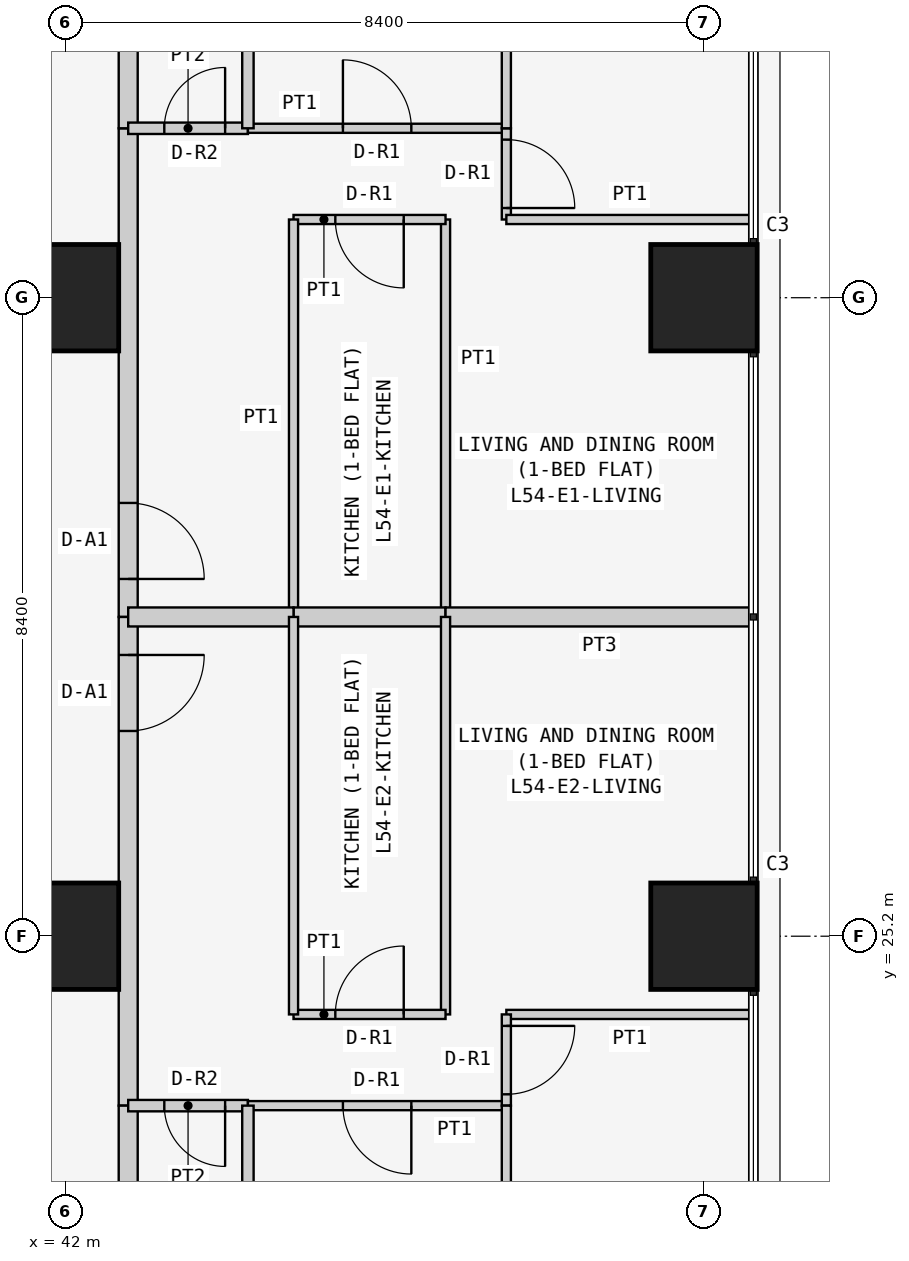
"""IFC4 building model, lengths in metres.
Left out: names, types, materials, properties, quantities, classifications, styles, units other than length and angle.
Written with IfcOpenShell. Run it as: python <this file> out.ifc"""

import sys

from ifc_helpers import new_model, si_unit, direction, frame, frame_2d, origin, origin_2d, place, context, subcontext, project, spatial, rectangle, extrude, element, fill, save


model = new_model("IFC4")
c1 = context("Model", 3, precision=1e-05, world=origin(), true_north=direction((0.0, 1.0)))
c2 = subcontext(c1, "Body", "Model", "MODEL_VIEW")
j1 = project(units=[si_unit("LENGTHUNIT", "METRE"), si_unit("PLANEANGLEUNIT", "RADIAN")], contexts=[c1])
p1 = place(None, origin())
s1 = spatial("IfcSite", under=j1, at=p1, CompositionType="ELEMENT")
p2 = place(p1, origin())
s2 = spatial("IfcBuilding", under=s1, at=p2, CompositionType="ELEMENT")
p3 = place(p2, frame((0.0, 0.0, 208.5)))
s3 = spatial("IfcBuildingStorey", under=s2, at=p3, CompositionType="ELEMENT", Elevation=208.5)
for number, where, z_axis, x_axis in (
    (1, (42.0, 25.2, 0.0), (0.0, 0.0, 1.0), (1.0, 0.0, 0.0)),
    (2, (42.0, 33.6, 0.0), (0.0, 0.0, 1.0), (1.0, 0.0, 0.0)),
    (3, (50.4, 25.2, 0.0), (0.0, 0.0, 1.0), (1.0, 0.0, 0.0)),
    (4, (50.4, 33.6, 0.0), (0.0, 0.0, 1.0), (1.0, 0.0, 0.0)),
):
    element("IfcColumn", number, at=place(p3, frame(where, z_axis=z_axis, x_axis=x_axis)), inside=s3, PredefinedType="COLUMN", context=c2, shape_type="SweptSolid", body=[
        extrude(rectangle(XDim=1.4, YDim=1.4, at=origin_2d()), origin(), (0.0, 0.0, 1.0), 3.6),
    ])
p4 = place(p3, frame((42.825, 35.829, 0.0), z_axis=(0.0, 0.0, 1.0), x_axis=(0.0, -1.0, 0.0)))
e5 = element("IfcWall", 5, at=p4, inside=s3, PredefinedType="PARTITIONING", context=c2, shape_type="SweptSolid", body=[
    extrude(rectangle(XDim=6.429, YDim=0.25, at=frame_2d((3.215, 0.0))), origin(), (0.0, 0.0, 1.0), 3.45),
])
p5 = place(p4, frame((4.929, 0.0, 0.0)))
e6 = element("IfcOpeningElement", 6, at=p5, cuts=e5, PredefinedType="OPENING", context=c2, shape_type="SweptSolid", body=[
    extrude(rectangle(XDim=1.0, YDim=2.1, at=frame_2d((0.5, 1.05))), frame((0.0, 0.135, 0.0), z_axis=(0.0, -1.0, 0.0), x_axis=(1.0, 0.0, 0.0)), (0.0, 0.0, 1.0), 0.27),
])
p6 = place(p3, frame((42.825, 42.7, 0.0), z_axis=(0.0, 0.0, 1.0), x_axis=(0.0, -1.0, 0.0)))
e7 = element("IfcWall", 7, at=p6, inside=s3, PredefinedType="PARTITIONING", context=c2, shape_type="SweptSolid", body=[
    extrude(rectangle(XDim=6.871, YDim=0.25, at=frame_2d((3.436, 0.0))), origin(), (0.0, 0.0, 1.0), 3.45),
])
p7 = place(p3, frame((42.825, 29.4, 0.0), z_axis=(0.0, 0.0, 1.0), x_axis=(0.0, -1.0, 0.0)))
e8 = element("IfcWall", 8, at=p7, inside=s3, PredefinedType="PARTITIONING", context=c2, shape_type="SweptSolid", body=[
    extrude(rectangle(XDim=6.429, YDim=0.25, at=frame_2d((3.214, 0.0))), origin(), (0.0, 0.0, 1.0), 3.45),
])
p8 = place(p7, frame((0.5, 0.0, 0.0)))
e9 = element("IfcOpeningElement", 9, at=p8, cuts=e8, PredefinedType="OPENING", context=c2, shape_type="SweptSolid", body=[
    extrude(rectangle(XDim=1.0, YDim=2.1, at=frame_2d((0.5, 1.05))), frame((0.0, 0.135, 0.0), z_axis=(0.0, -1.0, 0.0), x_axis=(1.0, 0.0, 0.0)), (0.0, 0.0, 1.0), 0.27),
])
p9 = place(p3, frame((42.825, 22.971, 0.0), z_axis=(0.0, 0.0, 1.0), x_axis=(0.0, -1.0, 0.0)))
e10 = element("IfcWall", 10, at=p9, inside=s3, PredefinedType="PARTITIONING", context=c2, shape_type="SweptSolid", body=[
    extrude(rectangle(XDim=6.871, YDim=0.25, at=frame_2d((3.436, 0.0))), origin(), (0.0, 0.0, 1.0), 3.45),
])
p10 = place(p3, frame((47.0, 29.4, 0.0), z_axis=(0.0, 0.0, 1.0), x_axis=(0.0, 1.0, 0.0)))
e11 = element("IfcWall", 11, at=p10, inside=s3, PredefinedType="PARTITIONING", context=c2, shape_type="SweptSolid", body=[
    extrude(rectangle(XDim=5.229, YDim=0.12, at=frame_2d((2.615, 0.0))), origin(), (0.0, 0.0, 1.0), 3.45),
])
p11 = place(p3, frame((47.0, 34.629, 0.0), z_axis=(0.0, 0.0, 1.0), x_axis=(-1.0, 0.0, 0.0)))
e12 = element("IfcWall", 12, at=p11, inside=s3, PredefinedType="PARTITIONING", context=c2, shape_type="SweptSolid", body=[
    extrude(rectangle(XDim=2.0, YDim=0.12, at=frame_2d((1.0, 0.0))), origin(), (0.0, 0.0, 1.0), 3.45),
])
p12 = place(p11, frame((0.55, 0.0, 0.0)))
e13 = element("IfcOpeningElement", 13, at=p12, cuts=e12, PredefinedType="OPENING", context=c2, shape_type="SweptSolid", body=[
    extrude(rectangle(XDim=0.9, YDim=2.1, at=frame_2d((0.45, 1.05))), frame((0.0, 0.07, 0.0), z_axis=(0.0, -1.0, 0.0), x_axis=(1.0, 0.0, 0.0)), (0.0, 0.0, 1.0), 0.14),
])
p13 = place(p3, frame((45.0, 34.629, 0.0), z_axis=(0.0, 0.0, 1.0), x_axis=(0.0, -1.0, 0.0)))
e14 = element("IfcWall", 14, at=p13, inside=s3, PredefinedType="PARTITIONING", context=c2, shape_type="SweptSolid", body=[
    extrude(rectangle(XDim=5.229, YDim=0.12, at=frame_2d((2.615, 0.0))), origin(), (0.0, 0.0, 1.0), 3.45),
])
p14 = place(p3, frame((45.0, 29.4, 0.0), z_axis=(0.0, 0.0, 1.0), x_axis=(1.0, 0.0, 0.0)))
e15 = element("IfcWall", 15, at=p14, inside=s3, PredefinedType="PARTITIONING", context=c2, shape_type="SweptSolid", body=[
    extrude(rectangle(XDim=2.0, YDim=0.25, at=frame_2d((1.0, 0.0))), origin(), (0.0, 0.0, 1.0), 3.45),
])
p15 = place(p3, frame((42.825, 35.829, 0.0), z_axis=(0.0, 0.0, 1.0), x_axis=(1.0, 0.0, 0.0)))
e16 = element("IfcWall", 16, at=p15, inside=s3, PredefinedType="PARTITIONING", context=c2, shape_type="SweptSolid", body=[
    extrude(rectangle(XDim=1.575, YDim=0.15, at=frame_2d((0.788, 0.0))), origin(), (0.0, 0.0, 1.0), 3.45),
])
p16 = place(p15, frame((0.475, 0.0, 0.0)))
e17 = element("IfcOpeningElement", 17, at=p16, cuts=e16, PredefinedType="OPENING", context=c2, shape_type="SweptSolid", body=[
    extrude(rectangle(XDim=0.8, YDim=2.1, at=frame_2d((0.4, 1.05))), frame((0.0, 0.085, 0.0), z_axis=(0.0, -1.0, 0.0), x_axis=(1.0, 0.0, 0.0)), (0.0, 0.0, 1.0), 0.17),
])
p17 = place(p3, frame((44.4, 35.829, 0.0), z_axis=(0.0, 0.0, 1.0), x_axis=(1.0, 0.0, 0.0)))
e18 = element("IfcWall", 18, at=p17, inside=s3, PredefinedType="PARTITIONING", context=c2, shape_type="SweptSolid", body=[
    extrude(rectangle(XDim=3.4, YDim=0.12, at=frame_2d((1.7, 0.0))), origin(), (0.0, 0.0, 1.0), 3.45),
])
p18 = place(p17, frame((1.25, 0.0, 0.0)))
e19 = element("IfcOpeningElement", 19, at=p18, cuts=e18, PredefinedType="OPENING", context=c2, shape_type="SweptSolid", body=[
    extrude(rectangle(XDim=0.9, YDim=2.1, at=frame_2d((0.45, 1.05))), frame((0.0, 0.07, 0.0), z_axis=(0.0, -1.0, 0.0), x_axis=(1.0, 0.0, 0.0)), (0.0, 0.0, 1.0), 0.14),
])
p19 = place(p3, frame((47.8, 35.829, 0.0), z_axis=(0.0, 0.0, 1.0), x_axis=(0.0, -1.0, 0.0)))
e20 = element("IfcWall", 20, at=p19, inside=s3, PredefinedType="PARTITIONING", context=c2, shape_type="SweptSolid", body=[
    extrude(rectangle(XDim=1.2, YDim=0.12, at=frame_2d((0.6, 0.0))), origin(), (0.0, 0.0, 1.0), 3.45),
])
p20 = place(p19, frame((0.149, 0.0, 0.0)))
e21 = element("IfcOpeningElement", 21, at=p20, cuts=e20, PredefinedType="OPENING", context=c2, shape_type="SweptSolid", body=[
    extrude(rectangle(XDim=0.9, YDim=2.1, at=frame_2d((0.45, 1.05))), frame((0.0, 0.07, 0.0), z_axis=(0.0, -1.0, 0.0), x_axis=(1.0, 0.0, 0.0)), (0.0, 0.0, 1.0), 0.14),
])
p21 = place(p3, frame((47.8, 34.629, 0.0), z_axis=(0.0, 0.0, 1.0), x_axis=(1.0, 0.0, 0.0)))
e22 = element("IfcWall", 22, at=p21, inside=s3, PredefinedType="PARTITIONING", context=c2, shape_type="SweptSolid", body=[
    extrude(rectangle(XDim=3.25, YDim=0.12, at=frame_2d((1.625, 0.0))), origin(), (0.0, 0.0, 1.0), 3.45),
])
p22 = place(p3, frame((45.0, 29.4, 0.0), z_axis=(0.0, 0.0, 1.0), x_axis=(-1.0, 0.0, 0.0)))
e23 = element("IfcWall", 23, at=p22, inside=s3, PredefinedType="PARTITIONING", context=c2, shape_type="SweptSolid", body=[
    extrude(rectangle(XDim=2.175, YDim=0.25, at=frame_2d((1.087, 0.0))), origin(), (0.0, 0.0, 1.0), 3.45),
])
p23 = place(p3, frame((51.05, 29.4, 0.0), z_axis=(0.0, 0.0, 1.0), x_axis=(-1.0, 0.0, 0.0)))
e24 = element("IfcWall", 24, at=p23, inside=s3, PredefinedType="PARTITIONING", context=c2, shape_type="SweptSolid", body=[
    extrude(rectangle(XDim=4.05, YDim=0.25, at=frame_2d((2.025, 0.0))), origin(), (0.0, 0.0, 1.0), 3.45),
])
p24 = place(p3, frame((44.4, 35.829, 0.0), z_axis=(0.0, 0.0, 1.0), x_axis=(0.0, 1.0, 0.0)))
e25 = element("IfcWall", 25, at=p24, inside=s3, PredefinedType="PARTITIONING", context=c2, shape_type="SweptSolid", body=[
    extrude(rectangle(XDim=6.871, YDim=0.15, at=frame_2d((3.436, 0.0))), origin(), (0.0, 0.0, 1.0), 3.45),
])
p25 = place(p3, frame((47.8, 35.829, 0.0), z_axis=(0.0, 0.0, 1.0), x_axis=(0.0, 1.0, 0.0)))
e26 = element("IfcWall", 26, at=p25, inside=s3, PredefinedType="PARTITIONING", context=c2, shape_type="SweptSolid", body=[
    extrude(rectangle(XDim=6.871, YDim=0.12, at=frame_2d((3.436, 0.0))), origin(), (0.0, 0.0, 1.0), 3.45),
])
p26 = place(p3, frame((47.0, 29.4, 0.0), z_axis=(0.0, 0.0, 1.0), x_axis=(0.0, -1.0, 0.0)))
e27 = element("IfcWall", 27, at=p26, inside=s3, PredefinedType="PARTITIONING", context=c2, shape_type="SweptSolid", body=[
    extrude(rectangle(XDim=5.229, YDim=0.12, at=frame_2d((2.615, 0.0))), origin(), (0.0, 0.0, 1.0), 3.45),
])
p27 = place(p3, frame((47.0, 24.171, 0.0), z_axis=(0.0, 0.0, 1.0), x_axis=(-1.0, 0.0, 0.0)))
e28 = element("IfcWall", 28, at=p27, inside=s3, PredefinedType="PARTITIONING", context=c2, shape_type="SweptSolid", body=[
    extrude(rectangle(XDim=2.0, YDim=0.12, at=frame_2d((1.0, 0.0))), origin(), (0.0, 0.0, 1.0), 3.45),
])
p28 = place(p27, frame((0.55, 0.0, 0.0)))
e29 = element("IfcOpeningElement", 29, at=p28, cuts=e28, PredefinedType="OPENING", context=c2, shape_type="SweptSolid", body=[
    extrude(rectangle(XDim=0.9, YDim=2.1, at=frame_2d((0.45, 1.05))), frame((0.0, 0.07, 0.0), z_axis=(0.0, -1.0, 0.0), x_axis=(1.0, 0.0, 0.0)), (0.0, 0.0, 1.0), 0.14),
])
p29 = place(p3, frame((45.0, 24.171, 0.0), z_axis=(0.0, 0.0, 1.0), x_axis=(0.0, 1.0, 0.0)))
e30 = element("IfcWall", 30, at=p29, inside=s3, PredefinedType="PARTITIONING", context=c2, shape_type="SweptSolid", body=[
    extrude(rectangle(XDim=5.229, YDim=0.12, at=frame_2d((2.615, 0.0))), origin(), (0.0, 0.0, 1.0), 3.45),
])
p30 = place(p3, frame((44.4, 22.971, 0.0), z_axis=(0.0, 0.0, 1.0), x_axis=(-1.0, 0.0, 0.0)))
e31 = element("IfcWall", 31, at=p30, inside=s3, PredefinedType="PARTITIONING", context=c2, shape_type="SweptSolid", body=[
    extrude(rectangle(XDim=1.575, YDim=0.15, at=frame_2d((0.788, 0.0))), origin(), (0.0, 0.0, 1.0), 3.45),
])
p31 = place(p30, frame((0.3, 0.0, 0.0)))
e32 = element("IfcOpeningElement", 32, at=p31, cuts=e31, PredefinedType="OPENING", context=c2, shape_type="SweptSolid", body=[
    extrude(rectangle(XDim=0.8, YDim=2.1, at=frame_2d((0.4, 1.05))), frame((0.0, 0.085, 0.0), z_axis=(0.0, -1.0, 0.0), x_axis=(1.0, 0.0, 0.0)), (0.0, 0.0, 1.0), 0.17),
])
p32 = place(p3, frame((47.8, 22.971, 0.0), z_axis=(0.0, 0.0, 1.0), x_axis=(-1.0, 0.0, 0.0)))
e33 = element("IfcWall", 33, at=p32, inside=s3, PredefinedType="PARTITIONING", context=c2, shape_type="SweptSolid", body=[
    extrude(rectangle(XDim=3.4, YDim=0.12, at=frame_2d((1.7, 0.0))), origin(), (0.0, 0.0, 1.0), 3.45),
])
p33 = place(p32, frame((1.25, 0.0, 0.0)))
e34 = element("IfcOpeningElement", 34, at=p33, cuts=e33, PredefinedType="OPENING", context=c2, shape_type="SweptSolid", body=[
    extrude(rectangle(XDim=0.9, YDim=2.1, at=frame_2d((0.45, 1.05))), frame((0.0, 0.07, 0.0), z_axis=(0.0, -1.0, 0.0), x_axis=(1.0, 0.0, 0.0)), (0.0, 0.0, 1.0), 0.14),
])
p34 = place(p3, frame((51.05, 24.171, 0.0), z_axis=(0.0, 0.0, 1.0), x_axis=(-1.0, 0.0, 0.0)))
e35 = element("IfcWall", 35, at=p34, inside=s3, PredefinedType="PARTITIONING", context=c2, shape_type="SweptSolid", body=[
    extrude(rectangle(XDim=3.25, YDim=0.12, at=frame_2d((1.625, 0.0))), origin(), (0.0, 0.0, 1.0), 3.45),
])
p35 = place(p3, frame((47.8, 24.171, 0.0), z_axis=(0.0, 0.0, 1.0), x_axis=(0.0, -1.0, 0.0)))
e36 = element("IfcWall", 36, at=p35, inside=s3, PredefinedType="PARTITIONING", context=c2, shape_type="SweptSolid", body=[
    extrude(rectangle(XDim=1.2, YDim=0.12, at=frame_2d((0.6, 0.0))), origin(), (0.0, 0.0, 1.0), 3.45),
])
p36 = place(p35, frame((0.151, 0.0, 0.0)))
e37 = element("IfcOpeningElement", 37, at=p36, cuts=e36, PredefinedType="OPENING", context=c2, shape_type="SweptSolid", body=[
    extrude(rectangle(XDim=0.9, YDim=2.1, at=frame_2d((0.45, 1.05))), frame((0.0, 0.07, 0.0), z_axis=(0.0, -1.0, 0.0), x_axis=(1.0, 0.0, 0.0)), (0.0, 0.0, 1.0), 0.14),
])
p37 = place(p3, frame((44.4, 22.971, 0.0), z_axis=(0.0, 0.0, 1.0), x_axis=(0.0, -1.0, 0.0)))
e38 = element("IfcWall", 38, at=p37, inside=s3, PredefinedType="PARTITIONING", context=c2, shape_type="SweptSolid", body=[
    extrude(rectangle(XDim=6.871, YDim=0.15, at=frame_2d((3.436, 0.0))), origin(), (0.0, 0.0, 1.0), 3.45),
])
p38 = place(p3, frame((47.8, 22.971, 0.0), z_axis=(0.0, 0.0, 1.0), x_axis=(0.0, -1.0, 0.0)))
e39 = element("IfcWall", 39, at=p38, inside=s3, PredefinedType="PARTITIONING", context=c2, shape_type="SweptSolid", body=[
    extrude(rectangle(XDim=6.871, YDim=0.12, at=frame_2d((3.436, 0.0))), origin(), (0.0, 0.0, 1.0), 3.45),
])
p39 = place(p5, origin())
e40 = element("IfcDoor", 40, at=p39, inside=s3, OperationType="SINGLE_SWING_RIGHT", PredefinedType="DOOR", context=c2, shape_type="SweptSolid", body=[
    extrude(rectangle(XDim=1.0, YDim=2.1, at=frame_2d((0.5, 1.05))), frame((0.0, 0.025, 0.0), z_axis=(0.0, -1.0, 0.0), x_axis=(1.0, 0.0, 0.0)), (0.0, 0.0, 1.0), 0.05),
])
fill(e6, e40)
p40 = place(p12, origin())
e41 = element("IfcDoor", 41, at=p40, inside=s3, OperationType="SINGLE_SWING_LEFT", PredefinedType="DOOR", context=c2, shape_type="SweptSolid", body=[
    extrude(rectangle(XDim=0.9, YDim=2.1, at=frame_2d((0.45, 1.05))), frame((0.0, 0.025, 0.0), z_axis=(0.0, -1.0, 0.0), x_axis=(1.0, 0.0, 0.0)), (0.0, 0.0, 1.0), 0.05),
])
fill(e13, e41)
p41 = place(p16, origin())
e42 = element("IfcDoor", 42, at=p41, inside=s3, OperationType="SINGLE_SWING_RIGHT", PredefinedType="DOOR", context=c2, shape_type="SweptSolid", body=[
    extrude(rectangle(XDim=0.8, YDim=2.1, at=frame_2d((0.4, 1.05))), frame((0.0, 0.025, 0.0), z_axis=(0.0, -1.0, 0.0), x_axis=(1.0, 0.0, 0.0)), (0.0, 0.0, 1.0), 0.05),
])
fill(e17, e42)
p42 = place(p18, origin())
e43 = element("IfcDoor", 43, at=p42, inside=s3, OperationType="SINGLE_SWING_LEFT", PredefinedType="DOOR", context=c2, shape_type="SweptSolid", body=[
    extrude(rectangle(XDim=0.9, YDim=2.1, at=frame_2d((0.45, 1.05))), frame((0.0, 0.025, 0.0), z_axis=(0.0, -1.0, 0.0), x_axis=(1.0, 0.0, 0.0)), (0.0, 0.0, 1.0), 0.05),
])
fill(e19, e43)
p43 = place(p20, origin())
e44 = element("IfcDoor", 44, at=p43, inside=s3, OperationType="SINGLE_SWING_RIGHT", PredefinedType="DOOR", context=c2, shape_type="SweptSolid", body=[
    extrude(rectangle(XDim=0.9, YDim=2.1, at=frame_2d((0.45, 1.05))), frame((0.0, 0.025, 0.0), z_axis=(0.0, -1.0, 0.0), x_axis=(1.0, 0.0, 0.0)), (0.0, 0.0, 1.0), 0.05),
])
fill(e21, e44)
p44 = place(p8, origin())
e45 = element("IfcDoor", 45, at=p44, inside=s3, OperationType="SINGLE_SWING_LEFT", PredefinedType="DOOR", context=c2, shape_type="SweptSolid", body=[
    extrude(rectangle(XDim=1.0, YDim=2.1, at=frame_2d((0.5, 1.05))), frame((0.0, 0.025, 0.0), z_axis=(0.0, -1.0, 0.0), x_axis=(1.0, 0.0, 0.0)), (0.0, 0.0, 1.0), 0.05),
])
fill(e9, e45)
p45 = place(p28, frame((0.9, 0.0, 0.0), z_axis=(0.0, 0.0, 1.0), x_axis=(-1.0, 0.0, 0.0)))
e46 = element("IfcDoor", 46, at=p45, inside=s3, OperationType="SINGLE_SWING_RIGHT", PredefinedType="DOOR", context=c2, shape_type="SweptSolid", body=[
    extrude(rectangle(XDim=0.9, YDim=2.1, at=frame_2d((0.45, 1.05))), frame((0.0, 0.025, 0.0), z_axis=(0.0, -1.0, 0.0), x_axis=(1.0, 0.0, 0.0)), (0.0, 0.0, 1.0), 0.05),
])
fill(e29, e46)
p46 = place(p31, origin())
e47 = element("IfcDoor", 47, at=p46, inside=s3, OperationType="SINGLE_SWING_LEFT", PredefinedType="DOOR", context=c2, shape_type="SweptSolid", body=[
    extrude(rectangle(XDim=0.8, YDim=2.1, at=frame_2d((0.4, 1.05))), frame((0.0, 0.025, 0.0), z_axis=(0.0, -1.0, 0.0), x_axis=(1.0, 0.0, 0.0)), (0.0, 0.0, 1.0), 0.05),
])
fill(e32, e47)
p47 = place(p33, origin())
e48 = element("IfcDoor", 48, at=p47, inside=s3, OperationType="SINGLE_SWING_LEFT", PredefinedType="DOOR", context=c2, shape_type="SweptSolid", body=[
    extrude(rectangle(XDim=0.9, YDim=2.1, at=frame_2d((0.45, 1.05))), frame((0.0, 0.025, 0.0), z_axis=(0.0, -1.0, 0.0), x_axis=(1.0, 0.0, 0.0)), (0.0, 0.0, 1.0), 0.05),
])
fill(e34, e48)
p48 = place(p36, origin())
e49 = element("IfcDoor", 49, at=p48, inside=s3, OperationType="SINGLE_SWING_LEFT", PredefinedType="DOOR", context=c2, shape_type="SweptSolid", body=[
    extrude(rectangle(XDim=0.9, YDim=2.1, at=frame_2d((0.45, 1.05))), frame((0.0, 0.025, 0.0), z_axis=(0.0, -1.0, 0.0), x_axis=(1.0, 0.0, 0.0)), (0.0, 0.0, 1.0), 0.05),
])
fill(e37, e49)
save(model, sys.argv[1])
